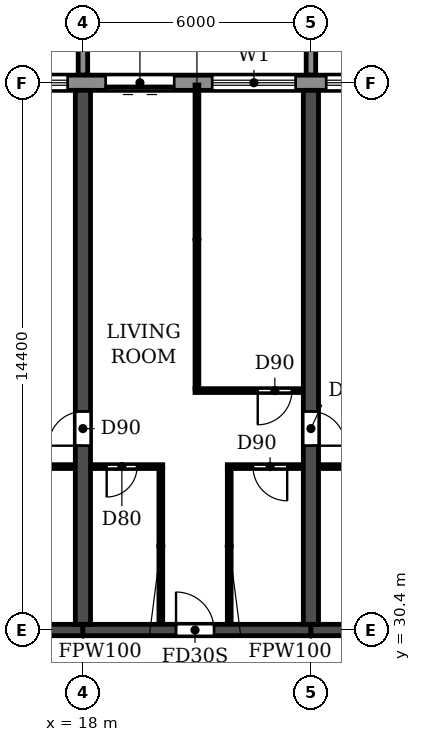
"""IFC4 building model, lengths in metres.
Left out: names, types, materials, properties, quantities, classifications, styles, units other than length and angle.
Written with IfcOpenShell. Run it as: python <this file> out.ifc"""

import sys

from ifc_helpers import new_model, si_unit, direction, frame, frame_2d, origin, place, context, subcontext, project, spatial, polyline, rectangle, outline, extrude, source, transform, mapped, element, fill, save


model = new_model("IFC4")
c1 = context("Model", 3, precision=1e-05, world=origin(), true_north=direction((0.0, 1.0)))
c2 = subcontext(c1, "Body", "Model", "MODEL_VIEW")
j1 = project(units=[si_unit("LENGTHUNIT", "METRE"), si_unit("PLANEANGLEUNIT", "RADIAN")], contexts=[c1])
p1 = place(None, origin())
s1 = spatial("IfcSite", under=j1, at=p1, CompositionType="ELEMENT")
p2 = place(p1, origin())
s2 = spatial("IfcBuilding", under=s1, at=p2, CompositionType="ELEMENT")
p3 = place(p2, frame((0.0, 0.0, 26.7)))
s3 = spatial("IfcBuildingStorey", under=s2, at=p3, CompositionType="ELEMENT", Elevation=26.7)
p4 = place(p3, frame((18.0, 30.55, 0.0), z_axis=(0.0, 0.0, 1.0), x_axis=(0.0, 1.0, 0.0)))
e1 = element("IfcWall", 1, at=p4, inside=s3, PredefinedType="SHEAR", context=c2, shape_type="SweptSolid", body=[
    extrude(rectangle(XDim=14.05, YDim=0.4, at=frame_2d((7.025, 0.0))), origin(), (0.0, 0.0, 1.0), 3.05),
])
p5 = place(p4, frame((4.7, 0.0, 0.0)))
e2 = element("IfcOpeningElement", 2, at=p5, cuts=e1, PredefinedType="OPENING", context=c2, shape_type="SweptSolid", body=[
    extrude(rectangle(XDim=0.9, YDim=2.1, at=frame_2d((0.45, 1.05))), frame((0.0, 0.21, 0.0), z_axis=(0.0, -1.0, 0.0), x_axis=(1.0, 0.0, 0.0)), (0.0, 0.0, 1.0), 0.42),
])
p6 = place(p3, frame((24.0, 30.55, 0.0), z_axis=(0.0, 0.0, 1.0), x_axis=(0.0, 1.0, 0.0)))
e3 = element("IfcWall", 3, at=p6, inside=s3, PredefinedType="SHEAR", context=c2, shape_type="SweptSolid", body=[
    extrude(rectangle(XDim=14.05, YDim=0.4, at=frame_2d((7.025, 0.0))), origin(), (0.0, 0.0, 1.0), 3.05),
])
p7 = place(p6, frame((4.7, 0.0, 0.0)))
e4 = element("IfcOpeningElement", 4, at=p7, cuts=e3, PredefinedType="OPENING", context=c2, shape_type="SweptSolid", body=[
    extrude(rectangle(XDim=0.9, YDim=2.1, at=frame_2d((0.45, 1.05))), frame((0.0, 0.21, 0.0), z_axis=(0.0, -1.0, 0.0), x_axis=(1.0, 0.0, 0.0)), (0.0, 0.0, 1.0), 0.42),
])
p8 = place(p3, frame((12.0, 30.4, 0.0), z_axis=(0.0, 0.0, 1.0), x_axis=(1.0, 0.0, 0.0)))
e5 = element("IfcWall", 5, at=p8, inside=s3, PredefinedType="SHEAR", context=c2, shape_type="SweptSolid", body=[
    extrude(rectangle(XDim=6.0, YDim=0.3, at=frame_2d((3.0, 0.0))), origin(), (0.0, 0.0, 1.0), 2.45),
])
p9 = place(p3, frame((18.0, 30.4, 0.0), z_axis=(0.0, 0.0, 1.0), x_axis=(1.0, 0.0, 0.0)))
e6 = element("IfcWall", 6, at=p9, inside=s3, PredefinedType="SHEAR", context=c2, shape_type="SweptSolid", body=[
    extrude(rectangle(XDim=6.0, YDim=0.3, at=frame_2d((3.0, 0.0))), origin(), (0.0, 0.0, 1.0), 2.45),
])
p10 = place(p9, frame((2.45, 0.0, 0.0)))
e7 = element("IfcOpeningElement", 7, at=p10, cuts=e6, PredefinedType="OPENING", context=c2, shape_type="SweptSolid", body=[
    extrude(rectangle(XDim=1.0, YDim=2.1, at=frame_2d((0.5, 1.05))), frame((0.0, 0.16, 0.0), z_axis=(0.0, -1.0, 0.0), x_axis=(1.0, 0.0, 0.0)), (0.0, 0.0, 1.0), 0.32),
])
p11 = place(p3, frame((24.0, 30.4, 0.0), z_axis=(0.0, 0.0, 1.0), x_axis=(1.0, 0.0, 0.0)))
e8 = element("IfcWall", 8, at=p11, inside=s3, PredefinedType="SHEAR", context=c2, shape_type="SweptSolid", body=[
    extrude(rectangle(XDim=6.0, YDim=0.3, at=frame_2d((3.0, 0.0))), origin(), (0.0, 0.0, 1.0), 2.45),
])
p12 = place(p3, frame((97.317, 44.8, 0.0), z_axis=(0.0, 0.0, 1.0), x_axis=(-1.0, 0.0, 0.0)))
e9 = element("IfcWall", 9, at=p12, inside=s3, PredefinedType="STANDARD", context=c2, shape_type="SweptSolid", body=[
    extrude(rectangle(XDim=92.634, YDim=0.4, at=frame_2d((46.317, 0.0))), origin(), (0.0, 0.0, 1.0), 3.05),
])
p13 = place(p12, frame((88.717, 0.0, 0.9)))
e10 = element("IfcOpeningElement", 10, at=p13, cuts=e9, PredefinedType="OPENING", context=c2, shape_type="SweptSolid", body=[
    extrude(rectangle(XDim=2.2, YDim=1.5, at=frame_2d((1.1, 0.75))), frame((0.0, 0.21, 0.0), z_axis=(0.0, -1.0, 0.0), x_axis=(1.0, 0.0, 0.0)), (0.0, 0.0, 1.0), 0.42),
])
p14 = place(p12, frame((85.917, 0.0, 0.0)))
e11 = element("IfcOpeningElement", 11, at=p14, cuts=e9, PredefinedType="OPENING", context=c2, shape_type="SweptSolid", body=[
    extrude(rectangle(XDim=1.8, YDim=2.4, at=frame_2d((0.9, 1.2))), frame((0.0, 0.21, 0.0), z_axis=(0.0, -1.0, 0.0), x_axis=(1.0, 0.0, 0.0)), (0.0, 0.0, 1.0), 0.42),
])
p15 = place(p12, frame((82.717, 0.0, 0.9)))
e12 = element("IfcOpeningElement", 12, at=p15, cuts=e9, PredefinedType="OPENING", context=c2, shape_type="SweptSolid", body=[
    extrude(rectangle(XDim=2.2, YDim=1.5, at=frame_2d((1.1, 0.75))), frame((0.0, 0.21, 0.0), z_axis=(0.0, -1.0, 0.0), x_axis=(1.0, 0.0, 0.0)), (0.0, 0.0, 1.0), 0.42),
])
p16 = place(p12, frame((79.717, 0.0, 0.9)))
e13 = element("IfcOpeningElement", 13, at=p16, cuts=e9, PredefinedType="OPENING", context=c2, shape_type="SweptSolid", body=[
    extrude(rectangle(XDim=2.2, YDim=1.5, at=frame_2d((1.1, 0.75))), frame((0.0, 0.21, 0.0), z_axis=(0.0, -1.0, 0.0), x_axis=(1.0, 0.0, 0.0)), (0.0, 0.0, 1.0), 0.42),
])
p17 = place(p12, frame((76.917, 0.0, 0.0)))
e14 = element("IfcOpeningElement", 14, at=p17, cuts=e9, PredefinedType="OPENING", context=c2, shape_type="SweptSolid", body=[
    extrude(rectangle(XDim=1.8, YDim=2.4, at=frame_2d((0.9, 1.2))), frame((0.0, 0.21, 0.0), z_axis=(0.0, -1.0, 0.0), x_axis=(1.0, 0.0, 0.0)), (0.0, 0.0, 1.0), 0.42),
])
p18 = place(p12, frame((73.717, 0.0, 0.9)))
e15 = element("IfcOpeningElement", 15, at=p18, cuts=e9, PredefinedType="OPENING", context=c2, shape_type="SweptSolid", body=[
    extrude(rectangle(XDim=2.2, YDim=1.5, at=frame_2d((1.1, 0.75))), frame((0.0, 0.21, 0.0), z_axis=(0.0, -1.0, 0.0), x_axis=(1.0, 0.0, 0.0)), (0.0, 0.0, 1.0), 0.42),
])
p19 = place(p12, frame((70.717, 0.0, 0.9)))
e16 = element("IfcOpeningElement", 16, at=p19, cuts=e9, PredefinedType="OPENING", context=c2, shape_type="SweptSolid", body=[
    extrude(rectangle(XDim=2.2, YDim=1.5, at=frame_2d((1.1, 0.75))), frame((0.0, 0.21, 0.0), z_axis=(0.0, -1.0, 0.0), x_axis=(1.0, 0.0, 0.0)), (0.0, 0.0, 1.0), 0.42),
])
p20 = place(p12, frame((67.717, 0.0, 0.9)))
e17 = element("IfcOpeningElement", 17, at=p20, cuts=e9, PredefinedType="OPENING", context=c2, shape_type="SweptSolid", body=[
    extrude(rectangle(XDim=2.2, YDim=1.5, at=frame_2d((1.1, 0.75))), frame((0.0, 0.21, 0.0), z_axis=(0.0, -1.0, 0.0), x_axis=(1.0, 0.0, 0.0)), (0.0, 0.0, 1.0), 0.42),
])
p21 = place(p12, frame((64.917, 0.0, 0.0)))
e18 = element("IfcOpeningElement", 18, at=p21, cuts=e9, PredefinedType="OPENING", context=c2, shape_type="SweptSolid", body=[
    extrude(rectangle(XDim=1.8, YDim=2.4, at=frame_2d((0.9, 1.2))), frame((0.0, 0.21, 0.0), z_axis=(0.0, -1.0, 0.0), x_axis=(1.0, 0.0, 0.0)), (0.0, 0.0, 1.0), 0.42),
])
p22 = place(p12, frame((61.717, 0.0, 0.9)))
e19 = element("IfcOpeningElement", 19, at=p22, cuts=e9, PredefinedType="OPENING", context=c2, shape_type="SweptSolid", body=[
    extrude(rectangle(XDim=2.2, YDim=1.5, at=frame_2d((1.1, 0.75))), frame((0.0, 0.21, 0.0), z_axis=(0.0, -1.0, 0.0), x_axis=(1.0, 0.0, 0.0)), (0.0, 0.0, 1.0), 0.42),
])
p23 = place(p12, frame((58.717, 0.0, 0.9)))
e20 = element("IfcOpeningElement", 20, at=p23, cuts=e9, PredefinedType="OPENING", context=c2, shape_type="SweptSolid", body=[
    extrude(rectangle(XDim=2.2, YDim=1.5, at=frame_2d((1.1, 0.75))), frame((0.0, 0.21, 0.0), z_axis=(0.0, -1.0, 0.0), x_axis=(1.0, 0.0, 0.0)), (0.0, 0.0, 1.0), 0.42),
])
p24 = place(p12, frame((55.917, 0.0, 0.0)))
e21 = element("IfcOpeningElement", 21, at=p24, cuts=e9, PredefinedType="OPENING", context=c2, shape_type="SweptSolid", body=[
    extrude(rectangle(XDim=1.8, YDim=2.4, at=frame_2d((0.9, 1.2))), frame((0.0, 0.21, 0.0), z_axis=(0.0, -1.0, 0.0), x_axis=(1.0, 0.0, 0.0)), (0.0, 0.0, 1.0), 0.42),
])
p25 = place(p12, frame((52.917, 0.0, 0.0)))
e22 = element("IfcOpeningElement", 22, at=p25, cuts=e9, PredefinedType="OPENING", context=c2, shape_type="SweptSolid", body=[
    extrude(rectangle(XDim=1.8, YDim=2.4, at=frame_2d((0.9, 1.2))), frame((0.0, 0.21, 0.0), z_axis=(0.0, -1.0, 0.0), x_axis=(1.0, 0.0, 0.0)), (0.0, 0.0, 1.0), 0.42),
])
p26 = place(p12, frame((49.717, 0.0, 0.9)))
e23 = element("IfcOpeningElement", 23, at=p26, cuts=e9, PredefinedType="OPENING", context=c2, shape_type="SweptSolid", body=[
    extrude(rectangle(XDim=2.2, YDim=1.5, at=frame_2d((1.1, 0.75))), frame((0.0, 0.21, 0.0), z_axis=(0.0, -1.0, 0.0), x_axis=(1.0, 0.0, 0.0)), (0.0, 0.0, 1.0), 0.42),
])
p27 = place(p12, frame((46.917, 0.0, 0.0)))
e24 = element("IfcOpeningElement", 24, at=p27, cuts=e9, PredefinedType="OPENING", context=c2, shape_type="SweptSolid", body=[
    extrude(rectangle(XDim=1.8, YDim=2.4, at=frame_2d((0.9, 1.2))), frame((0.0, 0.21, 0.0), z_axis=(0.0, -1.0, 0.0), x_axis=(1.0, 0.0, 0.0)), (0.0, 0.0, 1.0), 0.42),
])
p28 = place(p12, frame((43.717, 0.0, 0.9)))
e25 = element("IfcOpeningElement", 25, at=p28, cuts=e9, PredefinedType="OPENING", context=c2, shape_type="SweptSolid", body=[
    extrude(rectangle(XDim=2.2, YDim=1.5, at=frame_2d((1.1, 0.75))), frame((0.0, 0.21, 0.0), z_axis=(0.0, -1.0, 0.0), x_axis=(1.0, 0.0, 0.0)), (0.0, 0.0, 1.0), 0.42),
])
p29 = place(p12, frame((40.717, 0.0, 0.9)))
e26 = element("IfcOpeningElement", 26, at=p29, cuts=e9, PredefinedType="OPENING", context=c2, shape_type="SweptSolid", body=[
    extrude(rectangle(XDim=2.2, YDim=1.5, at=frame_2d((1.1, 0.75))), frame((0.0, 0.21, 0.0), z_axis=(0.0, -1.0, 0.0), x_axis=(1.0, 0.0, 0.0)), (0.0, 0.0, 1.0), 0.42),
])
p30 = place(p12, frame((37.917, 0.0, 0.0)))
e27 = element("IfcOpeningElement", 27, at=p30, cuts=e9, PredefinedType="OPENING", context=c2, shape_type="SweptSolid", body=[
    extrude(rectangle(XDim=1.8, YDim=2.4, at=frame_2d((0.9, 1.2))), frame((0.0, 0.21, 0.0), z_axis=(0.0, -1.0, 0.0), x_axis=(1.0, 0.0, 0.0)), (0.0, 0.0, 1.0), 0.42),
])
p31 = place(p12, frame((34.917, 0.0, 0.0)))
e28 = element("IfcOpeningElement", 28, at=p31, cuts=e9, PredefinedType="OPENING", context=c2, shape_type="SweptSolid", body=[
    extrude(rectangle(XDim=1.8, YDim=2.4, at=frame_2d((0.9, 1.2))), frame((0.0, 0.21, 0.0), z_axis=(0.0, -1.0, 0.0), x_axis=(1.0, 0.0, 0.0)), (0.0, 0.0, 1.0), 0.42),
])
p32 = place(p12, frame((31.717, 0.0, 0.9)))
e29 = element("IfcOpeningElement", 29, at=p32, cuts=e9, PredefinedType="OPENING", context=c2, shape_type="SweptSolid", body=[
    extrude(rectangle(XDim=2.2, YDim=1.5, at=frame_2d((1.1, 0.75))), frame((0.0, 0.21, 0.0), z_axis=(0.0, -1.0, 0.0), x_axis=(1.0, 0.0, 0.0)), (0.0, 0.0, 1.0), 0.42),
])
p33 = place(p12, frame((28.717, 0.0, 0.9)))
e30 = element("IfcOpeningElement", 30, at=p33, cuts=e9, PredefinedType="OPENING", context=c2, shape_type="SweptSolid", body=[
    extrude(rectangle(XDim=2.2, YDim=1.5, at=frame_2d((1.1, 0.75))), frame((0.0, 0.21, 0.0), z_axis=(0.0, -1.0, 0.0), x_axis=(1.0, 0.0, 0.0)), (0.0, 0.0, 1.0), 0.42),
])
p34 = place(p12, frame((25.717, 0.0, 0.9)))
e31 = element("IfcOpeningElement", 31, at=p34, cuts=e9, PredefinedType="OPENING", context=c2, shape_type="SweptSolid", body=[
    extrude(rectangle(XDim=2.2, YDim=1.5, at=frame_2d((1.1, 0.75))), frame((0.0, 0.21, 0.0), z_axis=(0.0, -1.0, 0.0), x_axis=(1.0, 0.0, 0.0)), (0.0, 0.0, 1.0), 0.42),
])
p35 = place(p12, frame((22.717, 0.0, 0.9)))
e32 = element("IfcOpeningElement", 32, at=p35, cuts=e9, PredefinedType="OPENING", context=c2, shape_type="SweptSolid", body=[
    extrude(rectangle(XDim=2.2, YDim=1.5, at=frame_2d((1.1, 0.75))), frame((0.0, 0.21, 0.0), z_axis=(0.0, -1.0, 0.0), x_axis=(1.0, 0.0, 0.0)), (0.0, 0.0, 1.0), 0.42),
])
p36 = place(p12, frame((19.917, 0.0, 0.0)))
e33 = element("IfcOpeningElement", 33, at=p36, cuts=e9, PredefinedType="OPENING", context=c2, shape_type="SweptSolid", body=[
    extrude(rectangle(XDim=1.8, YDim=2.4, at=frame_2d((0.9, 1.2))), frame((0.0, 0.21, 0.0), z_axis=(0.0, -1.0, 0.0), x_axis=(1.0, 0.0, 0.0)), (0.0, 0.0, 1.0), 0.42),
])
p37 = place(p12, frame((16.717, 0.0, 0.9)))
e34 = element("IfcOpeningElement", 34, at=p37, cuts=e9, PredefinedType="OPENING", context=c2, shape_type="SweptSolid", body=[
    extrude(rectangle(XDim=2.2, YDim=1.5, at=frame_2d((1.1, 0.75))), frame((0.0, 0.21, 0.0), z_axis=(0.0, -1.0, 0.0), x_axis=(1.0, 0.0, 0.0)), (0.0, 0.0, 1.0), 0.42),
])
p38 = place(p12, frame((13.717, 0.0, 0.9)))
e35 = element("IfcOpeningElement", 35, at=p38, cuts=e9, PredefinedType="OPENING", context=c2, shape_type="SweptSolid", body=[
    extrude(rectangle(XDim=2.2, YDim=1.5, at=frame_2d((1.1, 0.75))), frame((0.0, 0.21, 0.0), z_axis=(0.0, -1.0, 0.0), x_axis=(1.0, 0.0, 0.0)), (0.0, 0.0, 1.0), 0.42),
])
p39 = place(p12, frame((10.717, 0.0, 0.9)))
e36 = element("IfcOpeningElement", 36, at=p39, cuts=e9, PredefinedType="OPENING", context=c2, shape_type="SweptSolid", body=[
    extrude(rectangle(XDim=2.2, YDim=1.5, at=frame_2d((1.1, 0.75))), frame((0.0, 0.21, 0.0), z_axis=(0.0, -1.0, 0.0), x_axis=(1.0, 0.0, 0.0)), (0.0, 0.0, 1.0), 0.42),
])
p40 = place(p12, frame((7.917, 0.0, 0.0)))
e37 = element("IfcOpeningElement", 37, at=p40, cuts=e9, PredefinedType="OPENING", context=c2, shape_type="SweptSolid", body=[
    extrude(rectangle(XDim=1.8, YDim=2.4, at=frame_2d((0.9, 1.2))), frame((0.0, 0.21, 0.0), z_axis=(0.0, -1.0, 0.0), x_axis=(1.0, 0.0, 0.0)), (0.0, 0.0, 1.0), 0.42),
])
p41 = place(p12, frame((4.917, 0.0, 0.0)))
e38 = element("IfcOpeningElement", 38, at=p41, cuts=e9, PredefinedType="OPENING", context=c2, shape_type="SweptSolid", body=[
    extrude(rectangle(XDim=1.8, YDim=2.4, at=frame_2d((0.9, 1.2))), frame((0.0, 0.21, 0.0), z_axis=(0.0, -1.0, 0.0), x_axis=(1.0, 0.0, 0.0)), (0.0, 0.0, 1.0), 0.42),
])
p42 = place(p12, frame((1.717, 0.0, 0.9)))
e39 = element("IfcOpeningElement", 39, at=p42, cuts=e9, PredefinedType="OPENING", context=c2, shape_type="SweptSolid", body=[
    extrude(rectangle(XDim=2.2, YDim=1.5, at=frame_2d((1.1, 0.75))), frame((0.0, 0.21, 0.0), z_axis=(0.0, -1.0, 0.0), x_axis=(1.0, 0.0, 0.0)), (0.0, 0.0, 1.0), 0.42),
])
m1 = source(origin(), c2, "Body", "SweptSolid", [
    extrude(outline(polyline([(0.0, 0.0), (0.25, 0.0), (0.25, 3.1), (0.0, 3.1), (0.0, 0.0)])), origin(), (0.0, 0.0, 1.0), 3.1),
])
for number, where in (
    (40, (17.875, 45.0, 0.0)),
    (41, (23.875, 45.0, 0.0)),
):
    element("IfcWall", number, at=place(p3, frame(where)), inside=s3, PredefinedType="STANDARD", context=c2, shape_type="MappedRepresentation", body=[
        mapped(m1, transform((0.0, 0.0, 0.0))),
    ])
p43 = place(p3, frame((15.1, 34.7, 0.0), z_axis=(0.0, 0.0, 1.0), x_axis=(1.0, 0.0, 0.0)))
e42 = element("IfcWall", 42, at=p43, inside=s3, PredefinedType="PARTITIONING", context=c2, shape_type="SweptSolid", body=[
    extrude(rectangle(XDim=2.69, YDim=0.1, at=frame_2d((1.345, 0.0))), origin(), (0.0, 0.0, 1.0), 3.05),
])
p44 = place(p43, frame((1.0, 0.0, 0.0)))
e43 = element("IfcOpeningElement", 43, at=p44, cuts=e42, PredefinedType="OPENING", context=c2, shape_type="SweptSolid", body=[
    extrude(rectangle(XDim=0.8, YDim=2.1, at=frame_2d((0.4, 1.05))), frame((0.0, 0.06, 0.0), z_axis=(0.0, -1.0, 0.0), x_axis=(1.0, 0.0, 0.0)), (0.0, 0.0, 1.0), 0.12),
])
p45 = place(p3, frame((18.21, 34.7, 0.0), z_axis=(0.0, 0.0, 1.0), x_axis=(1.0, 0.0, 0.0)))
e44 = element("IfcWall", 44, at=p45, inside=s3, PredefinedType="PARTITIONING", context=c2, shape_type="SweptSolid", body=[
    extrude(rectangle(XDim=1.89, YDim=0.1, at=frame_2d((0.945, 0.0))), origin(), (0.0, 0.0, 1.0), 3.05),
])
p46 = place(p45, frame((0.415, 0.0, 0.0)))
e45 = element("IfcOpeningElement", 45, at=p46, cuts=e44, PredefinedType="OPENING", context=c2, shape_type="SweptSolid", body=[
    extrude(rectangle(XDim=0.8, YDim=2.1, at=frame_2d((0.4, 1.05))), frame((0.0, 0.06, 0.0), z_axis=(0.0, -1.0, 0.0), x_axis=(1.0, 0.0, 0.0)), (0.0, 0.0, 1.0), 0.12),
])
p47 = place(p3, frame((21.8, 34.7, 0.0), z_axis=(0.0, 0.0, 1.0), x_axis=(1.0, 0.0, 0.0)))
e46 = element("IfcWall", 46, at=p47, inside=s3, PredefinedType="PARTITIONING", context=c2, shape_type="SweptSolid", body=[
    extrude(rectangle(XDim=1.99, YDim=0.1, at=frame_2d((0.995, 0.0))), origin(), (0.0, 0.0, 1.0), 3.05),
])
p48 = place(p47, frame((0.675, 0.0, 0.0)))
e47 = element("IfcOpeningElement", 47, at=p48, cuts=e46, PredefinedType="OPENING", context=c2, shape_type="SweptSolid", body=[
    extrude(rectangle(XDim=0.9, YDim=2.1, at=frame_2d((0.45, 1.05))), frame((0.0, 0.06, 0.0), z_axis=(0.0, -1.0, 0.0), x_axis=(1.0, 0.0, 0.0)), (0.0, 0.0, 1.0), 0.12),
])
p49 = place(p3, frame((24.21, 34.7, 0.0), z_axis=(0.0, 0.0, 1.0), x_axis=(1.0, 0.0, 0.0)))
e48 = element("IfcWall", 48, at=p49, inside=s3, PredefinedType="PARTITIONING", context=c2, shape_type="SweptSolid", body=[
    extrude(rectangle(XDim=2.69, YDim=0.1, at=frame_2d((1.345, 0.0))), origin(), (0.0, 0.0, 1.0), 3.05),
])
p50 = place(p49, frame((0.89, 0.0, 0.0)))
e49 = element("IfcOpeningElement", 49, at=p50, cuts=e48, PredefinedType="OPENING", context=c2, shape_type="SweptSolid", body=[
    extrude(rectangle(XDim=0.8, YDim=2.1, at=frame_2d((0.4, 1.05))), frame((0.0, 0.06, 0.0), z_axis=(0.0, -1.0, 0.0), x_axis=(1.0, 0.0, 0.0)), (0.0, 0.0, 1.0), 0.12),
])
p51 = place(p3, frame((20.95, 36.7, 0.0), z_axis=(0.0, 0.0, 1.0), x_axis=(1.0, 0.0, 0.0)))
e50 = element("IfcWall", 50, at=p51, inside=s3, PredefinedType="PARTITIONING", context=c2, shape_type="SweptSolid", body=[
    extrude(rectangle(XDim=2.84, YDim=0.1, at=frame_2d((1.42, 0.0))), origin(), (0.0, 0.0, 1.0), 3.05),
])
p52 = place(p51, frame((1.65, 0.0, 0.0)))
e51 = element("IfcOpeningElement", 51, at=p52, cuts=e50, PredefinedType="OPENING", context=c2, shape_type="SweptSolid", body=[
    extrude(rectangle(XDim=0.9, YDim=2.1, at=frame_2d((0.45, 1.05))), frame((0.0, 0.06, 0.0), z_axis=(0.0, -1.0, 0.0), x_axis=(1.0, 0.0, 0.0)), (0.0, 0.0, 1.0), 0.12),
])
p53 = place(p3, frame((20.05, 30.56, 0.0), z_axis=(0.0, 0.0, 1.0), x_axis=(0.0, 1.0, 0.0)))
e52 = element("IfcWall", 52, at=p53, inside=s3, PredefinedType="PARTITIONING", context=c2, shape_type="SweptSolid", body=[
    extrude(rectangle(XDim=4.09, YDim=0.1, at=frame_2d((2.045, 0.0))), origin(), (0.0, 0.0, 1.0), 3.05),
])
p54 = place(p3, frame((21.0, 36.75, 0.0), z_axis=(0.0, 0.0, 1.0), x_axis=(0.0, 1.0, 0.0)))
e53 = element("IfcWall", 53, at=p54, inside=s3, PredefinedType="PARTITIONING", context=c2, shape_type="SweptSolid", body=[
    extrude(rectangle(XDim=7.99, YDim=0.1, at=frame_2d((3.995, 0.0))), origin(), (0.0, 0.0, 1.0), 3.05),
])
p55 = place(p3, frame((21.85, 30.56, 0.0), z_axis=(0.0, 0.0, 1.0), x_axis=(0.0, 1.0, 0.0)))
e54 = element("IfcWall", 54, at=p55, inside=s3, PredefinedType="PARTITIONING", context=c2, shape_type="SweptSolid", body=[
    extrude(rectangle(XDim=4.09, YDim=0.1, at=frame_2d((2.045, 0.0))), origin(), (0.0, 0.0, 1.0), 3.05),
])
p56 = place(p16, origin())
e55 = element("IfcWindow", 55, at=p56, inside=s3, PartitioningType="DOUBLE_PANEL_HORIZONTAL", PredefinedType="WINDOW", context=c2, shape_type="SweptSolid", body=[
    extrude(rectangle(XDim=2.2, YDim=1.5, at=frame_2d((1.1, 0.75))), frame((0.0, 0.03, 0.0), z_axis=(0.0, -1.0, 0.0), x_axis=(1.0, 0.0, 0.0)), (0.0, 0.0, 1.0), 0.06),
])
fill(e13, e55)
p57 = place(p17, origin())
e56 = element("IfcDoor", 56, at=p57, inside=s3, OperationType="DOUBLE_DOOR_SLIDING", PredefinedType="DOOR", context=c2, shape_type="SweptSolid", body=[
    extrude(rectangle(XDim=1.8, YDim=2.4, at=frame_2d((0.9, 1.2))), frame((0.0, 0.025, 0.0), z_axis=(0.0, -1.0, 0.0), x_axis=(1.0, 0.0, 0.0)), (0.0, 0.0, 1.0), 0.05),
])
fill(e14, e56)
p58 = place(p18, origin())
e57 = element("IfcWindow", 57, at=p58, inside=s3, PartitioningType="DOUBLE_PANEL_HORIZONTAL", PredefinedType="WINDOW", context=c2, shape_type="SweptSolid", body=[
    extrude(rectangle(XDim=2.2, YDim=1.5, at=frame_2d((1.1, 0.75))), frame((0.0, 0.03, 0.0), z_axis=(0.0, -1.0, 0.0), x_axis=(1.0, 0.0, 0.0)), (0.0, 0.0, 1.0), 0.06),
])
fill(e15, e57)
p59 = place(p19, origin())
e58 = element("IfcWindow", 58, at=p59, inside=s3, PartitioningType="DOUBLE_PANEL_HORIZONTAL", PredefinedType="WINDOW", context=c2, shape_type="SweptSolid", body=[
    extrude(rectangle(XDim=2.2, YDim=1.5, at=frame_2d((1.1, 0.75))), frame((0.0, 0.03, 0.0), z_axis=(0.0, -1.0, 0.0), x_axis=(1.0, 0.0, 0.0)), (0.0, 0.0, 1.0), 0.06),
])
fill(e16, e58)
p60 = place(p5, origin())
e59 = element("IfcDoor", 59, at=p60, inside=s3, OperationType="SINGLE_SWING_LEFT", PredefinedType="DOOR", context=c2, shape_type="SweptSolid", body=[
    extrude(rectangle(XDim=0.9, YDim=2.1, at=frame_2d((0.45, 1.05))), frame((0.0, 0.025, 0.0), z_axis=(0.0, -1.0, 0.0), x_axis=(1.0, 0.0, 0.0)), (0.0, 0.0, 1.0), 0.05),
])
fill(e2, e59)
p61 = place(p46, frame((0.8, 0.0, 0.0), z_axis=(0.0, 0.0, 1.0), x_axis=(-1.0, 0.0, 0.0)))
e60 = element("IfcDoor", 60, at=p61, inside=s3, OperationType="SINGLE_SWING_RIGHT", PredefinedType="DOOR", context=c2, shape_type="SweptSolid", body=[
    extrude(rectangle(XDim=0.8, YDim=2.1, at=frame_2d((0.4, 1.05))), frame((0.0, 0.025, 0.0), z_axis=(0.0, -1.0, 0.0), x_axis=(1.0, 0.0, 0.0)), (0.0, 0.0, 1.0), 0.05),
])
fill(e45, e60)
p62 = place(p10, origin())
e61 = element("IfcDoor", 61, at=p62, inside=s3, OperationType="SINGLE_SWING_LEFT", PredefinedType="DOOR", context=c2, shape_type="SweptSolid", body=[
    extrude(rectangle(XDim=1.0, YDim=2.1, at=frame_2d((0.5, 1.05))), frame((0.0, 0.025, 0.0), z_axis=(0.0, -1.0, 0.0), x_axis=(1.0, 0.0, 0.0)), (0.0, 0.0, 1.0), 0.05),
])
fill(e7, e61)
p63 = place(p48, frame((0.9, 0.0, 0.0), z_axis=(0.0, 0.0, 1.0), x_axis=(-1.0, 0.0, 0.0)))
e62 = element("IfcDoor", 62, at=p63, inside=s3, OperationType="SINGLE_SWING_LEFT", PredefinedType="DOOR", context=c2, shape_type="SweptSolid", body=[
    extrude(rectangle(XDim=0.9, YDim=2.1, at=frame_2d((0.45, 1.05))), frame((0.0, 0.025, 0.0), z_axis=(0.0, -1.0, 0.0), x_axis=(1.0, 0.0, 0.0)), (0.0, 0.0, 1.0), 0.05),
])
fill(e47, e62)
p64 = place(p52, frame((0.9, 0.0, 0.0), z_axis=(0.0, 0.0, 1.0), x_axis=(-1.0, 0.0, 0.0)))
e63 = element("IfcDoor", 63, at=p64, inside=s3, OperationType="SINGLE_SWING_RIGHT", PredefinedType="DOOR", context=c2, shape_type="SweptSolid", body=[
    extrude(rectangle(XDim=0.9, YDim=2.1, at=frame_2d((0.45, 1.05))), frame((0.0, 0.025, 0.0), z_axis=(0.0, -1.0, 0.0), x_axis=(1.0, 0.0, 0.0)), (0.0, 0.0, 1.0), 0.05),
])
fill(e51, e63)
p65 = place(p7, frame((0.9, 0.0, 0.0), z_axis=(0.0, 0.0, 1.0), x_axis=(-1.0, 0.0, 0.0)))
e64 = element("IfcDoor", 64, at=p65, inside=s3, OperationType="SINGLE_SWING_RIGHT", PredefinedType="DOOR", context=c2, shape_type="SweptSolid", body=[
    extrude(rectangle(XDim=0.9, YDim=2.1, at=frame_2d((0.45, 1.05))), frame((0.0, 0.025, 0.0), z_axis=(0.0, -1.0, 0.0), x_axis=(1.0, 0.0, 0.0)), (0.0, 0.0, 1.0), 0.05),
])
fill(e4, e64)
save(model, sys.argv[1])
